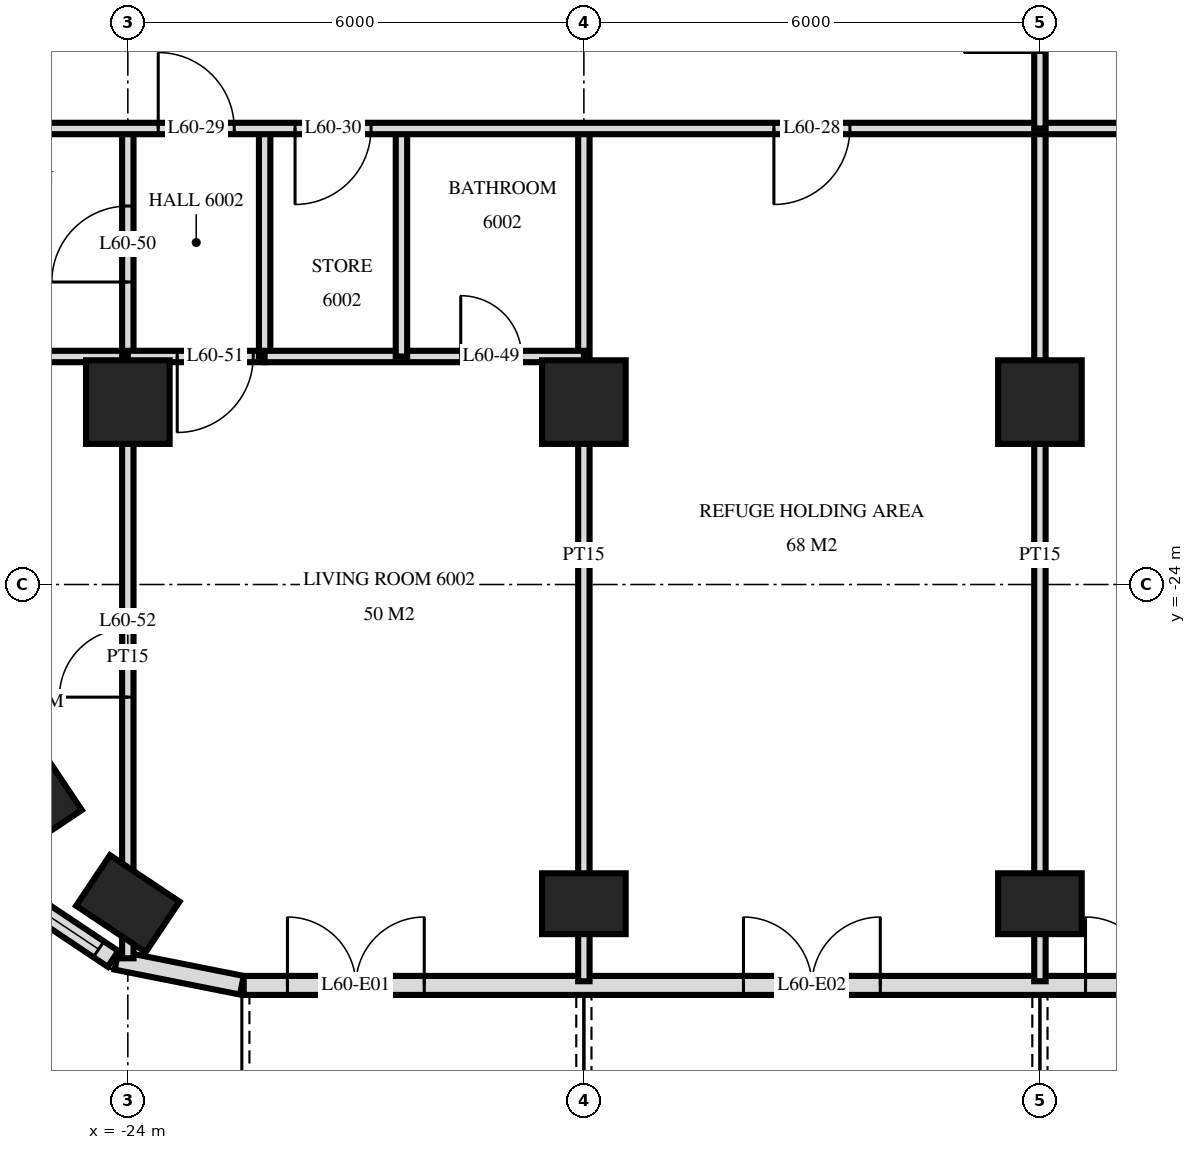
"""IFC4 building model, lengths in metres.
Left out: names, types, materials, properties, quantities, classifications, styles, units other than length and angle.
Written with IfcOpenShell. Run it as: python <this file> out.ifc"""

import sys

from ifc_helpers import new_model, si_unit, direction, frame, frame_2d, origin, origin_2d, place, context, subcontext, project, spatial, rectangle, extrude, element, fill, save


model = new_model("IFC4")
c1 = context("Model", 3, precision=1e-05, world=origin(), true_north=direction((0.0, 1.0)))
c2 = subcontext(c1, "Body", "Model", "MODEL_VIEW")
j1 = project(units=[si_unit("LENGTHUNIT", "METRE"), si_unit("PLANEANGLEUNIT", "RADIAN")], contexts=[c1])
p1 = place(None, origin())
s1 = spatial("IfcSite", under=j1, at=p1, CompositionType="ELEMENT")
p2 = place(p1, origin())
s2 = spatial("IfcBuilding", under=s1, at=p2, CompositionType="ELEMENT")
p3 = place(p2, frame((0.0, 0.0, 229.1)))
s3 = spatial("IfcBuildingStorey", under=s2, at=p3, CompositionType="ELEMENT", Elevation=229.1)
for number, where, z_axis, x_axis in (
    (1, (-25.244, -26.733, 0.0), (0.0, 0.0, 1.0), (-0.556, 0.831, 0.0)),
    (2, (-24.0, -28.2, 0.0), (0.0, 0.0, 1.0), (-0.831, 0.556, 0.0)),
):
    element("IfcColumn", number, at=place(p3, frame(where, z_axis=z_axis, x_axis=x_axis)), inside=s3, PredefinedType="COLUMN", context=c2, shape_type="SweptSolid", body=[
        extrude(rectangle(XDim=1.1, YDim=0.8, at=origin_2d()), origin(), (0.0, 0.0, 1.0), 3.5),
    ])
p4 = place(p3, frame((-24.0, -21.6, 0.0), z_axis=(0.0, 0.0, 1.0), x_axis=(1.0, 0.0, 0.0)))
e3 = element("IfcColumn", 3, at=p4, inside=s3, PredefinedType="COLUMN", context=c2, shape_type="SweptSolid", body=[
    extrude(rectangle(XDim=1.1, YDim=1.1, at=origin_2d()), origin(), (0.0, 0.0, 1.0), 3.5),
])
p5 = place(p3, frame((-18.0, -28.2, 0.0), z_axis=(0.0, 0.0, 1.0), x_axis=(1.0, 0.0, 0.0)))
e4 = element("IfcColumn", 4, at=p5, inside=s3, PredefinedType="COLUMN", context=c2, shape_type="SweptSolid", body=[
    extrude(rectangle(XDim=1.1, YDim=0.8, at=origin_2d()), origin(), (0.0, 0.0, 1.0), 3.5),
])
p6 = place(p3, frame((-18.0, -21.6, 0.0), z_axis=(0.0, 0.0, 1.0), x_axis=(1.0, 0.0, 0.0)))
e5 = element("IfcColumn", 5, at=p6, inside=s3, PredefinedType="COLUMN", context=c2, shape_type="SweptSolid", body=[
    extrude(rectangle(XDim=1.1, YDim=1.1, at=origin_2d()), origin(), (0.0, 0.0, 1.0), 3.5),
])
p7 = place(p3, frame((-12.0, -28.2, 0.0), z_axis=(0.0, 0.0, 1.0), x_axis=(1.0, 0.0, 0.0)))
e6 = element("IfcColumn", 6, at=p7, inside=s3, PredefinedType="COLUMN", context=c2, shape_type="SweptSolid", body=[
    extrude(rectangle(XDim=1.1, YDim=0.8, at=origin_2d()), origin(), (0.0, 0.0, 1.0), 3.5),
])
p8 = place(p3, frame((-12.0, -21.6, 0.0), z_axis=(0.0, 0.0, 1.0), x_axis=(1.0, 0.0, 0.0)))
e7 = element("IfcColumn", 7, at=p8, inside=s3, PredefinedType="COLUMN", context=c2, shape_type="SweptSolid", body=[
    extrude(rectangle(XDim=1.1, YDim=1.1, at=origin_2d()), origin(), (0.0, 0.0, 1.0), 3.5),
])
p9 = place(p3, frame((-25.571, -28.006, 0.0), z_axis=(0.0, 0.0, 1.0), x_axis=(0.831482937015, -0.55555029066, 0.0)))
e8 = element("IfcWall", 8, at=p9, inside=s3, PredefinedType="SOLIDWALL", context=c2, shape_type="SweptSolid", body=[
    extrude(rectangle(XDim=1.656, YDim=0.25, at=frame_2d((0.828, 0.0))), origin(), (0.0, 0.0, 1.0), 3.22),
])
p10 = place(p9, frame((0.228, 0.0, 0.9)))
e9 = element("IfcOpeningElement", 9, at=p10, cuts=e8, PredefinedType="OPENING", context=c2, shape_type="SweptSolid", body=[
    extrude(rectangle(XDim=1.2, YDim=1.5, at=frame_2d((0.6, 0.75))), frame((0.0, 0.135, 0.0), z_axis=(0.0, -1.0, 0.0), x_axis=(1.0, 0.0, 0.0)), (0.0, 0.0, 1.0), 0.27),
])
p11 = place(p3, frame((-24.149, -28.945, 0.0), z_axis=(0.0, 0.0, 1.0), x_axis=(0.980775640221, -0.19513878023, 0.0)))
e10 = element("IfcWall", 10, at=p11, inside=s3, PredefinedType="SOLIDWALL", context=c2, shape_type="SweptSolid", body=[
    extrude(rectangle(XDim=1.681, YDim=0.25, at=frame_2d((0.841, 0.0))), origin(), (0.0, 0.0, 1.0), 3.22),
])
p12 = place(p3, frame((-22.475, -29.275, 0.0), z_axis=(0.0, 0.0, 1.0), x_axis=(1.0, 0.0, 0.0)))
e11 = element("IfcWall", 11, at=p12, inside=s3, PredefinedType="SOLIDWALL", context=c2, shape_type="SweptSolid", body=[
    extrude(rectangle(XDim=44.951, YDim=0.25, at=frame_2d((22.475, 0.0))), origin(), (0.0, 0.0, 1.0), 3.22),
])
p13 = place(p12, frame((0.575, 0.0, 0.0)))
e12 = element("IfcOpeningElement", 12, at=p13, cuts=e11, PredefinedType="OPENING", context=c2, shape_type="SweptSolid", body=[
    extrude(rectangle(XDim=1.8, YDim=2.4, at=frame_2d((0.9, 1.2))), frame((0.0, 0.135, 0.0), z_axis=(0.0, -1.0, 0.0), x_axis=(1.0, 0.0, 0.0)), (0.0, 0.0, 1.0), 0.27),
])
p14 = place(p12, frame((6.575, 0.0, 0.0)))
e13 = element("IfcOpeningElement", 13, at=p14, cuts=e11, PredefinedType="OPENING", context=c2, shape_type="SweptSolid", body=[
    extrude(rectangle(XDim=1.8, YDim=2.4, at=frame_2d((0.9, 1.2))), frame((0.0, 0.135, 0.0), z_axis=(0.0, -1.0, 0.0), x_axis=(1.0, 0.0, 0.0)), (0.0, 0.0, 1.0), 0.27),
])
p15 = place(p12, frame((11.075, 0.0, 0.0)))
e14 = element("IfcOpeningElement", 14, at=p15, cuts=e11, PredefinedType="OPENING", context=c2, shape_type="SweptSolid", body=[
    extrude(rectangle(XDim=1.8, YDim=2.4, at=frame_2d((0.9, 1.2))), frame((0.0, 0.135, 0.0), z_axis=(0.0, -1.0, 0.0), x_axis=(1.0, 0.0, 0.0)), (0.0, 0.0, 1.0), 0.27),
])
p16 = place(p12, frame((13.775, 0.0, 0.9)))
e15 = element("IfcOpeningElement", 15, at=p16, cuts=e11, PredefinedType="OPENING", context=c2, shape_type="SweptSolid", body=[
    extrude(rectangle(XDim=2.4, YDim=1.5, at=frame_2d((1.2, 0.75))), frame((0.0, 0.135, 0.0), z_axis=(0.0, -1.0, 0.0), x_axis=(1.0, 0.0, 0.0)), (0.0, 0.0, 1.0), 0.27),
])
p17 = place(p12, frame((16.775, 0.0, 0.9)))
e16 = element("IfcOpeningElement", 16, at=p17, cuts=e11, PredefinedType="OPENING", context=c2, shape_type="SweptSolid", body=[
    extrude(rectangle(XDim=2.4, YDim=1.5, at=frame_2d((1.2, 0.75))), frame((0.0, 0.135, 0.0), z_axis=(0.0, -1.0, 0.0), x_axis=(1.0, 0.0, 0.0)), (0.0, 0.0, 1.0), 0.27),
])
p18 = place(p12, frame((20.075, 0.0, 0.0)))
e17 = element("IfcOpeningElement", 17, at=p18, cuts=e11, PredefinedType="OPENING", context=c2, shape_type="SweptSolid", body=[
    extrude(rectangle(XDim=1.8, YDim=2.4, at=frame_2d((0.9, 1.2))), frame((0.0, 0.135, 0.0), z_axis=(0.0, -1.0, 0.0), x_axis=(1.0, 0.0, 0.0)), (0.0, 0.0, 1.0), 0.27),
])
p19 = place(p12, frame((23.075, 0.0, 0.0)))
e18 = element("IfcOpeningElement", 18, at=p19, cuts=e11, PredefinedType="OPENING", context=c2, shape_type="SweptSolid", body=[
    extrude(rectangle(XDim=1.8, YDim=2.4, at=frame_2d((0.9, 1.2))), frame((0.0, 0.135, 0.0), z_axis=(0.0, -1.0, 0.0), x_axis=(1.0, 0.0, 0.0)), (0.0, 0.0, 1.0), 0.27),
])
p20 = place(p12, frame((25.775, 0.0, 0.9)))
e19 = element("IfcOpeningElement", 19, at=p20, cuts=e11, PredefinedType="OPENING", context=c2, shape_type="SweptSolid", body=[
    extrude(rectangle(XDim=2.4, YDim=1.5, at=frame_2d((1.2, 0.75))), frame((0.0, 0.135, 0.0), z_axis=(0.0, -1.0, 0.0), x_axis=(1.0, 0.0, 0.0)), (0.0, 0.0, 1.0), 0.27),
])
p21 = place(p12, frame((29.075, 0.0, 0.0)))
e20 = element("IfcOpeningElement", 20, at=p21, cuts=e11, PredefinedType="OPENING", context=c2, shape_type="SweptSolid", body=[
    extrude(rectangle(XDim=1.8, YDim=2.4, at=frame_2d((0.9, 1.2))), frame((0.0, 0.135, 0.0), z_axis=(0.0, -1.0, 0.0), x_axis=(1.0, 0.0, 0.0)), (0.0, 0.0, 1.0), 0.27),
])
p22 = place(p12, frame((31.775, 0.0, 0.9)))
e21 = element("IfcOpeningElement", 21, at=p22, cuts=e11, PredefinedType="OPENING", context=c2, shape_type="SweptSolid", body=[
    extrude(rectangle(XDim=2.4, YDim=1.5, at=frame_2d((1.2, 0.75))), frame((0.0, 0.135, 0.0), z_axis=(0.0, -1.0, 0.0), x_axis=(1.0, 0.0, 0.0)), (0.0, 0.0, 1.0), 0.27),
])
p23 = place(p12, frame((35.075, 0.0, 0.0)))
e22 = element("IfcOpeningElement", 22, at=p23, cuts=e11, PredefinedType="OPENING", context=c2, shape_type="SweptSolid", body=[
    extrude(rectangle(XDim=1.8, YDim=2.4, at=frame_2d((0.9, 1.2))), frame((0.0, 0.135, 0.0), z_axis=(0.0, -1.0, 0.0), x_axis=(1.0, 0.0, 0.0)), (0.0, 0.0, 1.0), 0.27),
])
p24 = place(p12, frame((37.775, 0.0, 0.9)))
e23 = element("IfcOpeningElement", 23, at=p24, cuts=e11, PredefinedType="OPENING", context=c2, shape_type="SweptSolid", body=[
    extrude(rectangle(XDim=2.4, YDim=1.5, at=frame_2d((1.2, 0.75))), frame((0.0, 0.135, 0.0), z_axis=(0.0, -1.0, 0.0), x_axis=(1.0, 0.0, 0.0)), (0.0, 0.0, 1.0), 0.27),
])
p25 = place(p12, frame((41.075, 0.0, 0.0)))
e24 = element("IfcOpeningElement", 24, at=p25, cuts=e11, PredefinedType="OPENING", context=c2, shape_type="SweptSolid", body=[
    extrude(rectangle(XDim=1.8, YDim=2.4, at=frame_2d((0.9, 1.2))), frame((0.0, 0.135, 0.0), z_axis=(0.0, -1.0, 0.0), x_axis=(1.0, 0.0, 0.0)), (0.0, 0.0, 1.0), 0.27),
])
p26 = place(p3, frame((-12.0, -18.0, 0.0), z_axis=(0.0, 0.0, 1.0), x_axis=(0.0, 1.0, 0.0)))
e25 = element("IfcWall", 25, at=p26, inside=s3, PredefinedType="PARTITIONING", context=c2, shape_type="SweptSolid", body=[
    extrude(rectangle(XDim=2.95, YDim=0.15, at=frame_2d((1.475, 0.0))), origin(), (0.0, 0.0, 1.0), 3.22),
])
p27 = place(p26, frame((1.0, 0.0, 0.0)))
e26 = element("IfcOpeningElement", 26, at=p27, cuts=e25, PredefinedType="OPENING", context=c2, shape_type="SweptSolid", body=[
    extrude(rectangle(XDim=1.0, YDim=2.1, at=frame_2d((0.5, 1.05))), frame((0.0, 0.085, 0.0), z_axis=(0.0, -1.0, 0.0), x_axis=(1.0, 0.0, 0.0)), (0.0, 0.0, 1.0), 0.17),
])
for number, where, z_axis, x_axis in (
    (27, (-12.0, -29.22, 0.0), (0.0, 0.0, 1.0), (0.0, 1.0, 0.0)),
    (28, (-18.0, -29.22, 0.0), (0.0, 0.0, 1.0), (0.0, 1.0, 0.0)),
):
    element("IfcWall", number, at=place(p3, frame(where, z_axis=z_axis, x_axis=x_axis)), inside=s3, PredefinedType="PARTITIONING", context=c2, shape_type="SweptSolid", body=[
        extrude(rectangle(XDim=11.22, YDim=0.15, at=frame_2d((5.61, 0.0))), origin(), (0.0, 0.0, 1.0), 3.22),
    ])
for number, where, z_axis, x_axis in (
    (29, (-20.4, -21.0, 0.0), (0.0, 0.0, 1.0), (0.0, 1.0, 0.0)),
    (30, (-22.2, -21.0, 0.0), (0.0, 0.0, 1.0), (0.0, 1.0, 0.0)),
):
    element("IfcWall", number, at=place(p3, frame(where, z_axis=z_axis, x_axis=x_axis)), inside=s3, PredefinedType="PARTITIONING", context=c2, shape_type="SweptSolid", body=[
        extrude(rectangle(XDim=3.0, YDim=0.15, at=frame_2d((1.5, 0.0))), origin(), (0.0, 0.0, 1.0), 3.22),
    ])
p28 = place(p3, frame((-24.0, -21.0, 0.0), z_axis=(0.0, 0.0, 1.0), x_axis=(0.0, 1.0, 0.0)))
e31 = element("IfcWall", 31, at=p28, inside=s3, PredefinedType="PARTITIONING", context=c2, shape_type="SweptSolid", body=[
    extrude(rectangle(XDim=3.0, YDim=0.15, at=frame_2d((1.5, 0.0))), origin(), (0.0, 0.0, 1.0), 3.22),
])
p29 = place(p28, frame((0.98, 0.0, 0.0)))
e32 = element("IfcOpeningElement", 32, at=p29, cuts=e31, PredefinedType="OPENING", context=c2, shape_type="SweptSolid", body=[
    extrude(rectangle(XDim=1.0, YDim=2.1, at=frame_2d((0.5, 1.05))), frame((0.0, 0.085, 0.0), z_axis=(0.0, -1.0, 0.0), x_axis=(1.0, 0.0, 0.0)), (0.0, 0.0, 1.0), 0.17),
])
p30 = place(p3, frame((-24.0, -28.918, 0.0), z_axis=(0.0, 0.0, 1.0), x_axis=(0.0, 1.0, 0.0)))
e33 = element("IfcWall", 33, at=p30, inside=s3, PredefinedType="PARTITIONING", context=c2, shape_type="SweptSolid", body=[
    extrude(rectangle(XDim=7.918, YDim=0.15, at=frame_2d((3.959, 0.0))), origin(), (0.0, 0.0, 1.0), 3.22),
])
p31 = place(p30, frame((3.436, 0.0, 0.0)))
e34 = element("IfcOpeningElement", 34, at=p31, cuts=e33, PredefinedType="OPENING", context=c2, shape_type="SweptSolid", body=[
    extrude(rectangle(XDim=0.9, YDim=2.1, at=frame_2d((0.45, 1.05))), frame((0.0, 0.085, 0.0), z_axis=(0.0, -1.0, 0.0), x_axis=(1.0, 0.0, 0.0)), (0.0, 0.0, 1.0), 0.17),
])
p32 = place(p3, frame((-24.0, -21.0, 0.0), z_axis=(0.0, 0.0, 1.0), x_axis=(1.0, 0.0, 0.0)))
e35 = element("IfcWall", 35, at=p32, inside=s3, PredefinedType="PARTITIONING", context=c2, shape_type="SweptSolid", body=[
    extrude(rectangle(XDim=1.8, YDim=0.15, at=frame_2d((0.9, 0.0))), origin(), (0.0, 0.0, 1.0), 3.22),
])
p33 = place(p32, frame((0.65, 0.0, 0.0)))
e36 = element("IfcOpeningElement", 36, at=p33, cuts=e35, PredefinedType="OPENING", context=c2, shape_type="SweptSolid", body=[
    extrude(rectangle(XDim=1.0, YDim=2.1, at=frame_2d((0.5, 1.05))), frame((0.0, 0.085, 0.0), z_axis=(0.0, -1.0, 0.0), x_axis=(1.0, 0.0, 0.0)), (0.0, 0.0, 1.0), 0.17),
])
p34 = place(p3, frame((-26.82, -21.0, 0.0), z_axis=(0.0, 0.0, 1.0), x_axis=(1.0, 0.0, 0.0)))
e37 = element("IfcWall", 37, at=p34, inside=s3, PredefinedType="PARTITIONING", context=c2, shape_type="SweptSolid", body=[
    extrude(rectangle(XDim=2.82, YDim=0.15, at=frame_2d((1.41, 0.0))), origin(), (0.0, 0.0, 1.0), 3.22),
])
p35 = place(p3, frame((-22.2, -21.0, 0.0), z_axis=(0.0, 0.0, 1.0), x_axis=(1.0, 0.0, 0.0)))
e38 = element("IfcWall", 38, at=p35, inside=s3, PredefinedType="PARTITIONING", context=c2, shape_type="SweptSolid", body=[
    extrude(rectangle(XDim=4.2, YDim=0.15, at=frame_2d((2.1, 0.0))), origin(), (0.0, 0.0, 1.0), 3.22),
])
p36 = place(p35, frame((2.58, 0.0, 0.0)))
e39 = element("IfcOpeningElement", 39, at=p36, cuts=e38, PredefinedType="OPENING", context=c2, shape_type="SweptSolid", body=[
    extrude(rectangle(XDim=0.8, YDim=2.1, at=frame_2d((0.4, 1.05))), frame((0.0, 0.085, 0.0), z_axis=(0.0, -1.0, 0.0), x_axis=(1.0, 0.0, 0.0)), (0.0, 0.0, 1.0), 0.17),
])
p37 = place(p3, frame((-26.82, -18.0, 0.0), z_axis=(0.0, 0.0, 1.0), x_axis=(1.0, 0.0, 0.0)))
e40 = element("IfcWall", 40, at=p37, inside=s3, PredefinedType="PARTITIONING", context=c2, shape_type="SweptSolid", body=[
    extrude(rectangle(XDim=53.64, YDim=0.15, at=frame_2d((26.82, 0.0))), origin(), (0.0, 0.0, 1.0), 3.22),
])
p38 = place(p37, frame((11.32, 0.0, 0.0)))
e41 = element("IfcOpeningElement", 41, at=p38, cuts=e40, PredefinedType="OPENING", context=c2, shape_type="SweptSolid", body=[
    extrude(rectangle(XDim=1.0, YDim=2.1, at=frame_2d((0.5, 1.05))), frame((0.0, 0.085, 0.0), z_axis=(0.0, -1.0, 0.0), x_axis=(1.0, 0.0, 0.0)), (0.0, 0.0, 1.0), 0.17),
])
p39 = place(p37, frame((3.22, 0.0, 0.0)))
e42 = element("IfcOpeningElement", 42, at=p39, cuts=e40, PredefinedType="OPENING", context=c2, shape_type="SweptSolid", body=[
    extrude(rectangle(XDim=1.0, YDim=2.1, at=frame_2d((0.5, 1.05))), frame((0.0, 0.085, 0.0), z_axis=(0.0, -1.0, 0.0), x_axis=(1.0, 0.0, 0.0)), (0.0, 0.0, 1.0), 0.17),
])
p40 = place(p37, frame((5.02, 0.0, 0.0)))
e43 = element("IfcOpeningElement", 43, at=p40, cuts=e40, PredefinedType="OPENING", context=c2, shape_type="SweptSolid", body=[
    extrude(rectangle(XDim=1.0, YDim=2.1, at=frame_2d((0.5, 1.05))), frame((0.0, 0.085, 0.0), z_axis=(0.0, -1.0, 0.0), x_axis=(1.0, 0.0, 0.0)), (0.0, 0.0, 1.0), 0.17),
])
p41 = place(p37, frame((38.97, 0.0, 0.0)))
e44 = element("IfcOpeningElement", 44, at=p41, cuts=e40, PredefinedType="OPENING", context=c2, shape_type="SweptSolid", body=[
    extrude(rectangle(XDim=1.0, YDim=2.1, at=frame_2d((0.5, 1.05))), frame((0.0, 0.085, 0.0), z_axis=(0.0, -1.0, 0.0), x_axis=(1.0, 0.0, 0.0)), (0.0, 0.0, 1.0), 0.17),
])
p42 = place(p37, frame((48.72, 0.0, 0.0)))
e45 = element("IfcOpeningElement", 45, at=p42, cuts=e40, PredefinedType="OPENING", context=c2, shape_type="SweptSolid", body=[
    extrude(rectangle(XDim=1.0, YDim=2.1, at=frame_2d((0.5, 1.05))), frame((0.0, 0.085, 0.0), z_axis=(0.0, -1.0, 0.0), x_axis=(1.0, 0.0, 0.0)), (0.0, 0.0, 1.0), 0.17),
])
p43 = place(p37, frame((46.92, 0.0, 0.0)))
e46 = element("IfcOpeningElement", 46, at=p43, cuts=e40, PredefinedType="OPENING", context=c2, shape_type="SweptSolid", body=[
    extrude(rectangle(XDim=1.0, YDim=2.1, at=frame_2d((0.5, 1.05))), frame((0.0, 0.085, 0.0), z_axis=(0.0, -1.0, 0.0), x_axis=(1.0, 0.0, 0.0)), (0.0, 0.0, 1.0), 0.17),
])
p44 = place(p37, frame((18.82, 0.0, 0.0)))
e47 = element("IfcOpeningElement", 47, at=p44, cuts=e40, PredefinedType="OPENING", context=c2, shape_type="SweptSolid", body=[
    extrude(rectangle(XDim=1.0, YDim=2.1, at=frame_2d((0.5, 1.05))), frame((0.0, 0.085, 0.0), z_axis=(0.0, -1.0, 0.0), x_axis=(1.0, 0.0, 0.0)), (0.0, 0.0, 1.0), 0.17),
])
p45 = place(p37, frame((27.82, 0.0, 0.0)))
e48 = element("IfcOpeningElement", 48, at=p45, cuts=e40, PredefinedType="OPENING", context=c2, shape_type="SweptSolid", body=[
    extrude(rectangle(XDim=1.0, YDim=2.1, at=frame_2d((0.5, 1.05))), frame((0.0, 0.085, 0.0), z_axis=(0.0, -1.0, 0.0), x_axis=(1.0, 0.0, 0.0)), (0.0, 0.0, 1.0), 0.17),
])
p46 = place(p37, frame((35.32, 0.0, 0.0)))
e49 = element("IfcOpeningElement", 49, at=p46, cuts=e40, PredefinedType="OPENING", context=c2, shape_type="SweptSolid", body=[
    extrude(rectangle(XDim=1.0, YDim=2.1, at=frame_2d((0.5, 1.05))), frame((0.0, 0.085, 0.0), z_axis=(0.0, -1.0, 0.0), x_axis=(1.0, 0.0, 0.0)), (0.0, 0.0, 1.0), 0.17),
])
p47 = place(p10, origin())
e50 = element("IfcWindow", 50, at=p47, inside=s3, PartitioningType="SINGLE_PANEL", PredefinedType="WINDOW", context=c2, shape_type="SweptSolid", body=[
    extrude(rectangle(XDim=1.2, YDim=1.5, at=frame_2d((0.6, 0.75))), frame((0.0, 0.03, 0.0), z_axis=(0.0, -1.0, 0.0), x_axis=(1.0, 0.0, 0.0)), (0.0, 0.0, 1.0), 0.06),
])
fill(e9, e50)
p48 = place(p13, origin())
e51 = element("IfcDoor", 51, at=p48, inside=s3, OperationType="DOUBLE_DOOR_SINGLE_SWING", PredefinedType="DOOR", context=c2, shape_type="SweptSolid", body=[
    extrude(rectangle(XDim=1.8, YDim=2.4, at=frame_2d((0.9, 1.2))), frame((0.0, 0.025, 0.0), z_axis=(0.0, -1.0, 0.0), x_axis=(1.0, 0.0, 0.0)), (0.0, 0.0, 1.0), 0.05),
])
fill(e12, e51)
p49 = place(p14, origin())
e52 = element("IfcDoor", 52, at=p49, inside=s3, OperationType="DOUBLE_DOOR_SINGLE_SWING", PredefinedType="DOOR", context=c2, shape_type="SweptSolid", body=[
    extrude(rectangle(XDim=1.8, YDim=2.4, at=frame_2d((0.9, 1.2))), frame((0.0, 0.025, 0.0), z_axis=(0.0, -1.0, 0.0), x_axis=(1.0, 0.0, 0.0)), (0.0, 0.0, 1.0), 0.05),
])
fill(e13, e52)
p50 = place(p15, origin())
e53 = element("IfcDoor", 53, at=p50, inside=s3, OperationType="DOUBLE_DOOR_SINGLE_SWING", PredefinedType="DOOR", context=c2, shape_type="SweptSolid", body=[
    extrude(rectangle(XDim=1.8, YDim=2.4, at=frame_2d((0.9, 1.2))), frame((0.0, 0.025, 0.0), z_axis=(0.0, -1.0, 0.0), x_axis=(1.0, 0.0, 0.0)), (0.0, 0.0, 1.0), 0.05),
])
fill(e14, e53)
p51 = place(p38, frame((0.5, 0.0, 0.0), z_axis=(0.0, 0.0, 1.0), x_axis=(-1.0, 0.0, 0.0)))
e54 = element("IfcDoor", 54, at=p51, inside=s3, OperationType="SINGLE_SWING_LEFT", PredefinedType="DOOR", context=c2, shape_type="SweptSolid", body=[
    extrude(rectangle(XDim=1.0, YDim=2.1, at=frame_2d((0.0, 1.05))), frame((0.0, -0.025, 0.0), z_axis=(0.0, 1.0, 0.0), x_axis=(-1.0, 0.0, 0.0)), (0.0, 0.0, 1.0), 0.05),
])
fill(e41, e54)
p52 = place(p39, origin())
e55 = element("IfcDoor", 55, at=p52, inside=s3, OperationType="SINGLE_SWING_RIGHT", PredefinedType="DOOR", context=c2, shape_type="SweptSolid", body=[
    extrude(rectangle(XDim=1.0, YDim=2.1, at=frame_2d((0.5, 1.05))), frame((0.0, 0.025, 0.0), z_axis=(0.0, -1.0, 0.0), x_axis=(1.0, 0.0, 0.0)), (0.0, 0.0, 1.0), 0.05),
])
fill(e42, e55)
p53 = place(p40, frame((0.5, 0.0, 0.0), z_axis=(0.0, 0.0, 1.0), x_axis=(-1.0, 0.0, 0.0)))
e56 = element("IfcDoor", 56, at=p53, inside=s3, OperationType="SINGLE_SWING_LEFT", PredefinedType="DOOR", context=c2, shape_type="SweptSolid", body=[
    extrude(rectangle(XDim=1.0, YDim=2.1, at=frame_2d((0.0, 1.05))), frame((0.0, -0.025, 0.0), z_axis=(0.0, 1.0, 0.0), x_axis=(-1.0, 0.0, 0.0)), (0.0, 0.0, 1.0), 0.05),
])
fill(e43, e56)
p54 = place(p36, origin())
e57 = element("IfcDoor", 57, at=p54, inside=s3, OperationType="SINGLE_SWING_RIGHT", PredefinedType="DOOR", context=c2, shape_type="SweptSolid", body=[
    extrude(rectangle(XDim=0.8, YDim=2.1, at=frame_2d((0.4, 1.05))), frame((0.0, 0.025, 0.0), z_axis=(0.0, -1.0, 0.0), x_axis=(1.0, 0.0, 0.0)), (0.0, 0.0, 1.0), 0.05),
])
fill(e39, e57)
p55 = place(p29, origin())
e58 = element("IfcDoor", 58, at=p55, inside=s3, OperationType="SINGLE_SWING_RIGHT", PredefinedType="DOOR", context=c2, shape_type="SweptSolid", body=[
    extrude(rectangle(XDim=1.0, YDim=2.1, at=frame_2d((0.5, 1.05))), frame((0.0, 0.025, 0.0), z_axis=(0.0, -1.0, 0.0), x_axis=(1.0, 0.0, 0.0)), (0.0, 0.0, 1.0), 0.05),
])
fill(e32, e58)
p56 = place(p33, frame((0.5, 0.0, 0.0), z_axis=(0.0, 0.0, 1.0), x_axis=(-1.0, 0.0, 0.0)))
e59 = element("IfcDoor", 59, at=p56, inside=s3, OperationType="SINGLE_SWING_LEFT", PredefinedType="DOOR", context=c2, shape_type="SweptSolid", body=[
    extrude(rectangle(XDim=1.0, YDim=2.1, at=frame_2d((0.0, 1.05))), frame((0.0, -0.025, 0.0), z_axis=(0.0, 1.0, 0.0), x_axis=(-1.0, 0.0, 0.0)), (0.0, 0.0, 1.0), 0.05),
])
fill(e36, e59)
p57 = place(p31, origin())
e60 = element("IfcDoor", 60, at=p57, inside=s3, OperationType="SINGLE_SWING_RIGHT", PredefinedType="DOOR", context=c2, shape_type="SweptSolid", body=[
    extrude(rectangle(XDim=0.9, YDim=2.1, at=frame_2d((0.45, 1.05))), frame((0.0, 0.025, 0.0), z_axis=(0.0, -1.0, 0.0), x_axis=(1.0, 0.0, 0.0)), (0.0, 0.0, 1.0), 0.05),
])
fill(e34, e60)
save(model, sys.argv[1])
